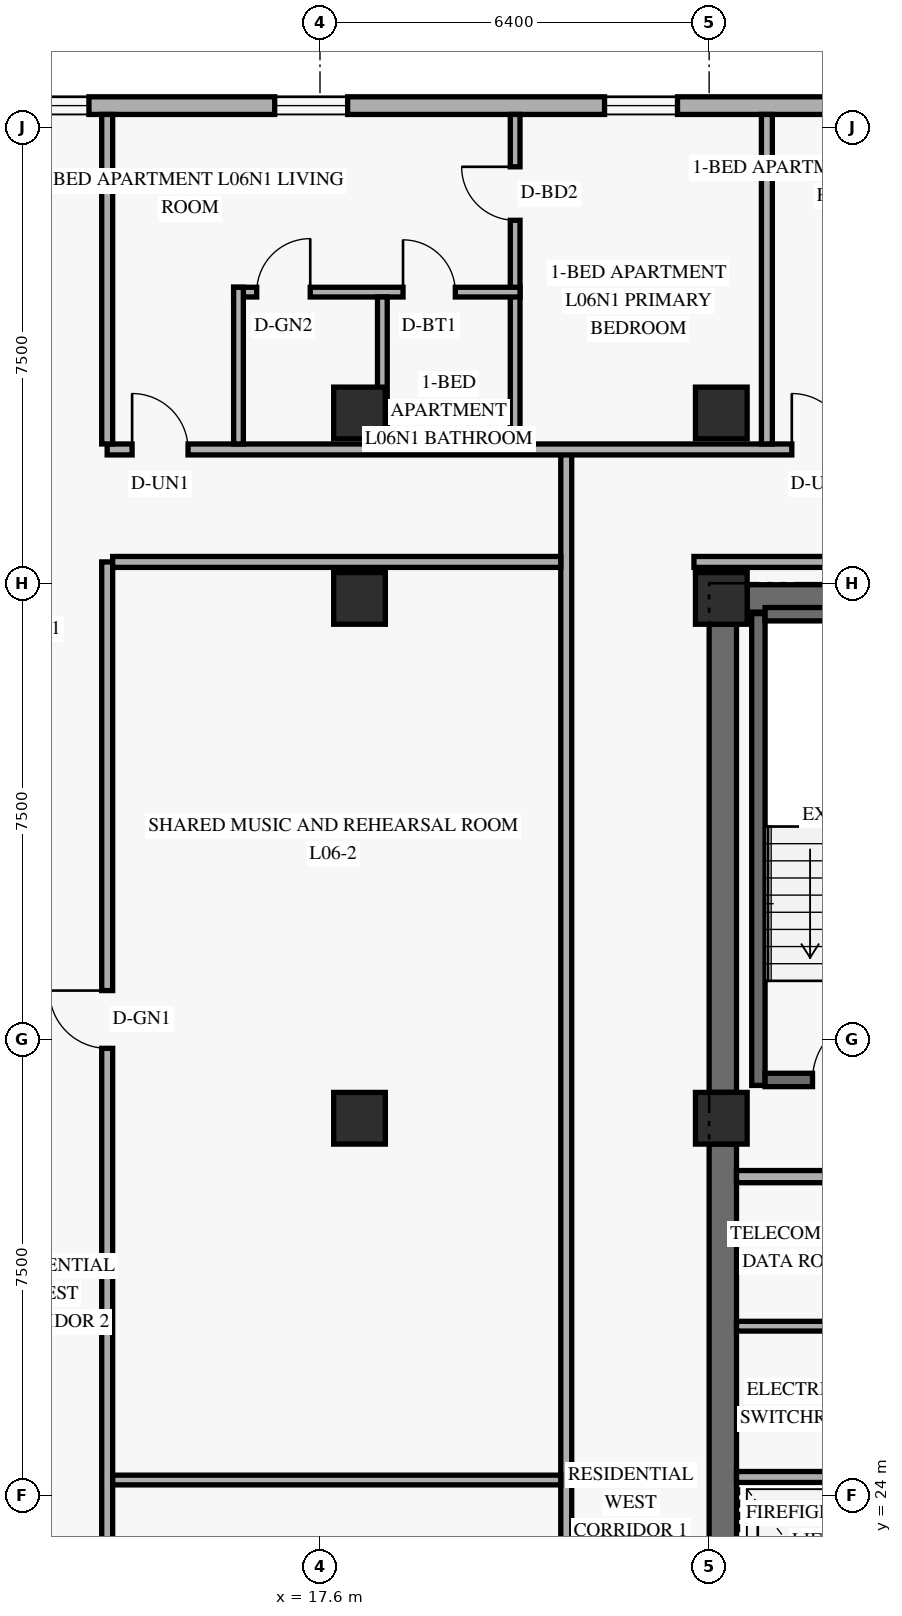
"""IFC4 building model, lengths in metres.
Left out: names, types, materials, properties, quantities, classifications, styles, units other than length and angle.
Written with IfcOpenShell. Run it as: python <this file> out.ifc"""

import sys

from ifc_helpers import new_model, si_unit, direction, frame, frame_2d, origin, origin_2d, place, context, subcontext, project, spatial, rectangle, extrude, element, fill, save


model = new_model("IFC4")
c1 = context("Model", 3, precision=1e-05, world=origin(), true_north=direction((0.0, 1.0)))
c2 = subcontext(c1, "Body", "Model", "MODEL_VIEW")
j1 = project(units=[si_unit("LENGTHUNIT", "METRE"), si_unit("PLANEANGLEUNIT", "RADIAN")], contexts=[c1])
p1 = place(None, origin())
s1 = spatial("IfcSite", under=j1, at=p1, CompositionType="ELEMENT")
p2 = place(p1, origin())
s2 = spatial("IfcBuilding", under=s1, at=p2, CompositionType="ELEMENT")
p3 = place(p2, frame((0.0, 0.0, 27.6)))
s3 = spatial("IfcBuildingStorey", under=s2, at=p3, CompositionType="ELEMENT", Elevation=27.6)
p4 = place(p3, frame((24.225, 17.975, 0.0), z_axis=(0.0, 0.0, 1.0), x_axis=(0.0, 1.0, 0.0)))
e1 = element("IfcWall", 1, at=p4, inside=s3, PredefinedType="SHEAR", context=c2, shape_type="SweptSolid", body=[
    extrude(rectangle(XDim=11.8, YDim=0.45, at=frame_2d((5.9, 0.0))), origin(), (0.0, 0.0, 1.0), 2.667),
])
p5 = place(p3, frame((24.225, 30.625, 0.0), z_axis=(0.0, 0.0, 1.0), x_axis=(0.0, 1.0, 0.0)))
e2 = element("IfcWall", 2, at=p5, inside=s3, PredefinedType="SHEAR", context=c2, shape_type="SweptSolid", body=[
    extrude(rectangle(XDim=7.7, YDim=0.45, at=frame_2d((3.85, 0.0))), origin(), (0.0, 0.0, 1.0), 2.667),
])
p6 = place(p3, frame((24.625, 38.75, 0.0), z_axis=(0.0, 0.0, 1.0), x_axis=(1.0, 0.0, 0.0)))
e3 = element("IfcWall", 3, at=p6, inside=s3, PredefinedType="SHEAR", context=c2, shape_type="SweptSolid", body=[
    extrude(rectangle(XDim=10.15, YDim=0.45, at=frame_2d((5.075, 0.0))), origin(), (0.0, 0.0, 1.0), 3.36),
])
p7 = place(p3, frame((24.81, 30.74, 0.0), z_axis=(0.0, 0.0, 1.0), x_axis=(0.0, 1.0, 0.0)))
e4 = element("IfcWall", 4, at=p7, inside=s3, PredefinedType="SHEAR", context=c2, shape_type="SweptSolid", body=[
    extrude(rectangle(XDim=7.76, YDim=0.22, at=frame_2d((3.88, 0.0))), origin(), (0.0, 0.0, 1.0), 3.36),
])
p8 = place(p3, frame((24.92, 30.83, 0.0), z_axis=(0.0, 0.0, 1.0), x_axis=(1.0, 0.0, 0.0)))
e5 = element("IfcWall", 5, at=p8, inside=s3, PredefinedType="SHEAR", context=c2, shape_type="SweptSolid", body=[
    extrude(rectangle(XDim=3.16, YDim=0.22, at=frame_2d((1.58, 0.0))), origin(), (0.0, 0.0, 1.0), 3.36),
])
p9 = place(p8, frame((0.78, 0.0, 0.0)))
e6 = element("IfcOpeningElement", 6, at=p9, cuts=e5, PredefinedType="OPENING", context=c2, shape_type="SweptSolid", body=[
    extrude(rectangle(XDim=1.05, YDim=2.15, at=frame_2d((0.525, 1.075))), frame((0.0, 0.12, 0.0), z_axis=(0.0, -1.0, 0.0), x_axis=(1.0, 0.0, 0.0)), (0.0, 0.0, 1.0), 0.24),
])
p10 = place(p3, frame((24.92, 38.49, 0.0), z_axis=(0.0, 0.0, 1.0), x_axis=(1.0, 0.0, 0.0)))
e7 = element("IfcWall", 7, at=p10, inside=s3, PredefinedType="SHEAR", context=c2, shape_type="SweptSolid", body=[
    extrude(rectangle(XDim=3.16, YDim=0.22, at=frame_2d((1.58, 0.0))), origin(), (0.0, 0.0, 1.0), 3.36),
])
for number, where, z_axis, x_axis in (
    (8, (18.25, 30.2, 0.0), (0.0, 0.0, 1.0), (1.0, 0.0, 0.0)),
    (9, (18.25, 38.75, 0.0), (0.0, 0.0, 1.0), (1.0, 0.0, 0.0)),
    (10, (18.25, 41.8, 0.0), (0.0, 0.0, 1.0), (1.0, 0.0, 0.0)),
    (11, (24.2, 30.2, 0.0), (0.0, 0.0, 1.0), (1.0, 0.0, 0.0)),
    (12, (24.2, 38.75, 0.0), (0.0, 0.0, 1.0), (1.0, 0.0, 0.0)),
    (13, (24.2, 41.8, 0.0), (0.0, 0.0, 1.0), (1.0, 0.0, 0.0)),
):
    element("IfcColumn", number, at=place(p3, frame(where, z_axis=z_axis, x_axis=x_axis)), inside=s3, PredefinedType="COLUMN", context=c2, shape_type="SweptSolid", body=[
        extrude(rectangle(XDim=0.85, YDim=0.85, at=origin_2d()), origin(), (0.0, 0.0, 1.0), 3.6),
    ])
p11 = place(p3, frame((44.98, 46.855, 0.0), z_axis=(0.0, 0.0, 1.0), x_axis=(-1.0, 0.0, 0.0)))
e14 = element("IfcWall", 14, at=p11, inside=s3, PredefinedType="SOLIDWALL", context=c2, shape_type="SweptSolid", body=[
    extrude(rectangle(XDim=39.56, YDim=0.29, at=frame_2d((19.78, 0.0))), origin(), (0.0, 0.0, 1.0), 3.36),
])
p12 = place(p11, frame((35.52, 0.0, 0.85)))
e15 = element("IfcOpeningElement", 15, at=p12, cuts=e14, PredefinedType="OPENING", context=c2, shape_type="SweptSolid", body=[
    extrude(rectangle(XDim=1.2, YDim=1.5, at=frame_2d((0.6, 0.75))), frame((0.0, 0.155, 0.0), z_axis=(0.0, -1.0, 0.0), x_axis=(1.0, 0.0, 0.0)), (0.0, 0.0, 1.0), 0.31),
])
p13 = place(p11, frame((31.18, 0.0, 0.85)))
e16 = element("IfcOpeningElement", 16, at=p13, cuts=e14, PredefinedType="OPENING", context=c2, shape_type="SweptSolid", body=[
    extrude(rectangle(XDim=1.2, YDim=1.5, at=frame_2d((0.6, 0.75))), frame((0.0, 0.155, 0.0), z_axis=(0.0, -1.0, 0.0), x_axis=(1.0, 0.0, 0.0)), (0.0, 0.0, 1.0), 0.31),
])
p14 = place(p11, frame((26.925, 0.0, 0.85)))
e17 = element("IfcOpeningElement", 17, at=p14, cuts=e14, PredefinedType="OPENING", context=c2, shape_type="SweptSolid", body=[
    extrude(rectangle(XDim=1.2, YDim=1.5, at=frame_2d((0.6, 0.75))), frame((0.0, 0.155, 0.0), z_axis=(0.0, -1.0, 0.0), x_axis=(1.0, 0.0, 0.0)), (0.0, 0.0, 1.0), 0.31),
])
p15 = place(p11, frame((21.5, 0.0, 0.85)))
e18 = element("IfcOpeningElement", 18, at=p15, cuts=e14, PredefinedType="OPENING", context=c2, shape_type="SweptSolid", body=[
    extrude(rectangle(XDim=1.2, YDim=1.5, at=frame_2d((0.6, 0.75))), frame((0.0, 0.155, 0.0), z_axis=(0.0, -1.0, 0.0), x_axis=(1.0, 0.0, 0.0)), (0.0, 0.0, 1.0), 0.31),
])
p16 = place(p11, frame((16.265, 0.0, 0.85)))
e19 = element("IfcOpeningElement", 19, at=p16, cuts=e14, PredefinedType="OPENING", context=c2, shape_type="SweptSolid", body=[
    extrude(rectangle(XDim=1.2, YDim=1.5, at=frame_2d((0.6, 0.75))), frame((0.0, 0.155, 0.0), z_axis=(0.0, -1.0, 0.0), x_axis=(1.0, 0.0, 0.0)), (0.0, 0.0, 1.0), 0.31),
])
p17 = place(p11, frame((11.03, 0.0, 0.85)))
e20 = element("IfcOpeningElement", 20, at=p17, cuts=e14, PredefinedType="OPENING", context=c2, shape_type="SweptSolid", body=[
    extrude(rectangle(XDim=1.2, YDim=1.5, at=frame_2d((0.6, 0.75))), frame((0.0, 0.155, 0.0), z_axis=(0.0, -1.0, 0.0), x_axis=(1.0, 0.0, 0.0)), (0.0, 0.0, 1.0), 0.31),
])
p18 = place(p11, frame((7.895, 0.0, 0.85)))
e21 = element("IfcOpeningElement", 21, at=p18, cuts=e14, PredefinedType="OPENING", context=c2, shape_type="SweptSolid", body=[
    extrude(rectangle(XDim=1.2, YDim=1.5, at=frame_2d((0.6, 0.75))), frame((0.0, 0.155, 0.0), z_axis=(0.0, -1.0, 0.0), x_axis=(1.0, 0.0, 0.0)), (0.0, 0.0, 1.0), 0.31),
])
p19 = place(p11, frame((3.115, 0.0, 0.85)))
e22 = element("IfcOpeningElement", 22, at=p19, cuts=e14, PredefinedType="OPENING", context=c2, shape_type="SweptSolid", body=[
    extrude(rectangle(XDim=1.2, YDim=1.5, at=frame_2d((0.6, 0.75))), frame((0.0, 0.155, 0.0), z_axis=(0.0, -1.0, 0.0), x_axis=(1.0, 0.0, 0.0)), (0.0, 0.0, 1.0), 0.31),
])
p20 = place(p3, frame((24.45, 24.3, 0.0), z_axis=(0.0, 0.0, 1.0), x_axis=(1.0, 0.0, 0.0)))
e23 = element("IfcWall", 23, at=p20, inside=s3, PredefinedType="STANDARD", context=c2, shape_type="SweptSolid", body=[
    extrude(rectangle(XDim=6.83, YDim=0.18, at=frame_2d((3.415, 0.0))), origin(), (0.0, 0.0, 1.0), 3.36),
])
p21 = place(p3, frame((24.45, 29.24, 0.0), z_axis=(0.0, 0.0, 1.0), x_axis=(1.0, 0.0, 0.0)))
e24 = element("IfcWall", 24, at=p21, inside=s3, PredefinedType="STANDARD", context=c2, shape_type="SweptSolid", body=[
    extrude(rectangle(XDim=3.65, YDim=0.2, at=frame_2d((1.825, 0.0))), origin(), (0.0, 0.0, 1.0), 3.36),
])
p22 = place(p3, frame((24.45, 26.78, 0.0), z_axis=(0.0, 0.0, 1.0), x_axis=(1.0, 0.0, 0.0)))
e25 = element("IfcWall", 25, at=p22, inside=s3, PredefinedType="PARTITIONING", context=c2, shape_type="SweptSolid", body=[
    extrude(rectangle(XDim=3.55, YDim=0.16, at=frame_2d((1.775, 0.0))), origin(), (0.0, 0.0, 1.0), 3.36),
])
p23 = place(p3, frame((21.65, 6.8, 0.0), z_axis=(0.0, 0.0, 1.0), x_axis=(0.0, 1.0, 0.0)))
e26 = element("IfcWall", 26, at=p23, inside=s3, PredefinedType="STANDARD", context=c2, shape_type="SweptSolid", body=[
    extrude(rectangle(XDim=34.4, YDim=0.18, at=frame_2d((17.2, 0.0))), origin(), (0.0, 0.0, 1.0), 2.649),
])
p24 = place(p3, frame((14.1, 41.2, 0.0), z_axis=(0.0, 0.0, 1.0), x_axis=(1.0, 0.0, 0.0)))
e27 = element("IfcWall", 27, at=p24, inside=s3, PredefinedType="STANDARD", context=c2, shape_type="SweptSolid", body=[
    extrude(rectangle(XDim=21.32, YDim=0.18, at=frame_2d((10.66, 0.0))), origin(), (0.0, 0.0, 1.0), 2.649),
])
p25 = place(p24, frame((0.41, 0.0, 0.0)))
e28 = element("IfcOpeningElement", 28, at=p25, cuts=e27, PredefinedType="OPENING", context=c2, shape_type="SweptSolid", body=[
    extrude(rectangle(XDim=0.92, YDim=2.15, at=frame_2d((0.46, 1.075))), frame((0.0, 0.1, 0.0), z_axis=(0.0, -1.0, 0.0), x_axis=(1.0, 0.0, 0.0)), (0.0, 0.0, 1.0), 0.2),
])
p26 = place(p24, frame((11.26, 0.0, 0.0)))
e29 = element("IfcOpeningElement", 29, at=p26, cuts=e27, PredefinedType="OPENING", context=c2, shape_type="SweptSolid", body=[
    extrude(rectangle(XDim=0.92, YDim=2.15, at=frame_2d((0.46, 1.075))), frame((0.0, 0.1, 0.0), z_axis=(0.0, -1.0, 0.0), x_axis=(1.0, 0.0, 0.0)), (0.0, 0.0, 1.0), 0.2),
])
p27 = place(p3, frame((23.75, 39.35, 0.0), z_axis=(0.0, 0.0, 1.0), x_axis=(1.0, 0.0, 0.0)))
e30 = element("IfcWall", 30, at=p27, inside=s3, PredefinedType="STANDARD", context=c2, shape_type="SweptSolid", body=[
    extrude(rectangle(XDim=11.67, YDim=0.18, at=frame_2d((5.835, 0.0))), origin(), (0.0, 0.0, 1.0), 2.649),
])
p28 = place(p3, frame((14.1, 8.65, 0.0), z_axis=(0.0, 0.0, 1.0), x_axis=(0.0, 1.0, 0.0)))
e31 = element("IfcWall", 31, at=p28, inside=s3, PredefinedType="STANDARD", context=c2, shape_type="SweptSolid", body=[
    extrude(rectangle(XDim=30.7, YDim=0.18, at=frame_2d((15.35, 0.0))), origin(), (0.0, 0.0, 1.0), 2.649),
])
p29 = place(p28, frame((7.35, 0.0, 0.0)))
e32 = element("IfcOpeningElement", 32, at=p29, cuts=e31, PredefinedType="OPENING", context=c2, shape_type="SweptSolid", body=[
    extrude(rectangle(XDim=0.95, YDim=2.15, at=frame_2d((0.475, 1.075))), frame((0.0, 0.1, 0.0), z_axis=(0.0, -1.0, 0.0), x_axis=(1.0, 0.0, 0.0)), (0.0, 0.0, 1.0), 0.2),
])
p30 = place(p28, frame((22.7, 0.0, 0.0)))
e33 = element("IfcOpeningElement", 33, at=p30, cuts=e31, PredefinedType="OPENING", context=c2, shape_type="SweptSolid", body=[
    extrude(rectangle(XDim=0.95, YDim=2.15, at=frame_2d((0.475, 1.075))), frame((0.0, 0.1, 0.0), z_axis=(0.0, -1.0, 0.0), x_axis=(1.0, 0.0, 0.0)), (0.0, 0.0, 1.0), 0.2),
])
p31 = place(p3, frame((14.19, 39.35, 0.0), z_axis=(0.0, 0.0, 1.0), x_axis=(1.0, 0.0, 0.0)))
e34 = element("IfcWall", 34, at=p31, inside=s3, PredefinedType="STANDARD", context=c2, shape_type="SweptSolid", body=[
    extrude(rectangle(XDim=7.37, YDim=0.18, at=frame_2d((3.685, 0.0))), origin(), (0.0, 0.0, 1.0), 2.649),
])
p32 = place(p3, frame((14.1, 41.29, 0.0), z_axis=(0.0, 0.0, 1.0), x_axis=(0.0, 1.0, 0.0)))
e35 = element("IfcWall", 35, at=p32, inside=s3, PredefinedType="PARTITIONING", context=c2, shape_type="SweptSolid", body=[
    extrude(rectangle(XDim=5.42, YDim=0.18, at=frame_2d((2.71, 0.0))), origin(), (0.0, 0.0, 1.0), 2.809),
])
p33 = place(p3, frame((14.19, 24.25, 0.0), z_axis=(0.0, 0.0, 1.0), x_axis=(1.0, 0.0, 0.0)))
e36 = element("IfcWall", 36, at=p33, inside=s3, PredefinedType="PARTITIONING", context=c2, shape_type="SweptSolid", body=[
    extrude(rectangle(XDim=7.37, YDim=0.16, at=frame_2d((3.685, 0.0))), origin(), (0.0, 0.0, 1.0), 2.649),
])
p34 = place(p3, frame((24.95, 41.29, 0.0), z_axis=(0.0, 0.0, 1.0), x_axis=(0.0, 1.0, 0.0)))
e37 = element("IfcWall", 37, at=p34, inside=s3, PredefinedType="PARTITIONING", context=c2, shape_type="SweptSolid", body=[
    extrude(rectangle(XDim=5.42, YDim=0.18, at=frame_2d((2.71, 0.0))), origin(), (0.0, 0.0, 1.0), 2.809),
])
p35 = place(p3, frame((20.81, 41.29, 0.0), z_axis=(0.0, 0.0, 1.0), x_axis=(0.0, 1.0, 0.0)))
e38 = element("IfcWall", 38, at=p35, inside=s3, PredefinedType="PARTITIONING", context=c2, shape_type="SweptSolid", body=[
    extrude(rectangle(XDim=5.42, YDim=0.16, at=frame_2d((2.71, 0.0))), origin(), (0.0, 0.0, 1.0), 2.809),
])
p36 = place(p35, frame((3.679, 0.0, 0.0)))
e39 = element("IfcOpeningElement", 39, at=p36, cuts=e38, PredefinedType="OPENING", context=c2, shape_type="SweptSolid", body=[
    extrude(rectangle(XDim=0.88, YDim=2.14, at=frame_2d((0.44, 1.07))), frame((0.0, 0.09, 0.0), z_axis=(0.0, -1.0, 0.0), x_axis=(1.0, 0.0, 0.0)), (0.0, 0.0, 1.0), 0.18),
])
p37 = place(p3, frame((16.18, 43.788, 0.0), z_axis=(0.0, 0.0, 1.0), x_axis=(1.0, 0.0, 0.0)))
e40 = element("IfcWall", 40, at=p37, inside=s3, PredefinedType="PLUMBINGWALL", context=c2, shape_type="SweptSolid", body=[
    extrude(rectangle(XDim=4.71, YDim=0.16, at=frame_2d((2.355, 0.0))), origin(), (0.0, 0.0, 1.0), 3.36),
])
p38 = place(p37, frame((0.38, 0.0, 0.0)))
e41 = element("IfcOpeningElement", 41, at=p38, cuts=e40, PredefinedType="OPENING", context=c2, shape_type="SweptSolid", body=[
    extrude(rectangle(XDim=0.88, YDim=2.12, at=frame_2d((0.44, 1.06))), frame((0.0, 0.09, 0.0), z_axis=(0.0, -1.0, 0.0), x_axis=(1.0, 0.0, 0.0)), (0.0, 0.0, 1.0), 0.18),
])
p39 = place(p37, frame((2.786, 0.0, 0.0)))
e42 = element("IfcOpeningElement", 42, at=p39, cuts=e40, PredefinedType="OPENING", context=c2, shape_type="SweptSolid", body=[
    extrude(rectangle(XDim=0.86, YDim=2.12, at=frame_2d((0.43, 1.06))), frame((0.0, 0.09, 0.0), z_axis=(0.0, -1.0, 0.0), x_axis=(1.0, 0.0, 0.0)), (0.0, 0.0, 1.0), 0.18),
])
p40 = place(p3, frame((16.26, 41.29, 0.0), z_axis=(0.0, 0.0, 1.0), x_axis=(0.0, 1.0, 0.0)))
e43 = element("IfcWall", 43, at=p40, inside=s3, PredefinedType="PLUMBINGWALL", context=c2, shape_type="SweptSolid", body=[
    extrude(rectangle(XDim=2.577, YDim=0.16, at=frame_2d((1.289, 0.0))), origin(), (0.0, 0.0, 1.0), 2.809),
])
p41 = place(p3, frame((18.625, 41.29, 0.0), z_axis=(0.0, 0.0, 1.0), x_axis=(0.0, 1.0, 0.0)))
e44 = element("IfcWall", 44, at=p41, inside=s3, PredefinedType="PLUMBINGWALL", context=c2, shape_type="SweptSolid", body=[
    extrude(rectangle(XDim=2.417, YDim=0.16, at=frame_2d((1.209, 0.0))), origin(), (0.0, 0.0, 1.0), 2.809),
])
p42 = place(p13, origin())
e45 = element("IfcWindow", 45, at=p42, inside=s3, PartitioningType="SINGLE_PANEL", PredefinedType="WINDOW", context=c2, shape_type="SweptSolid", body=[
    extrude(rectangle(XDim=1.2, YDim=1.5, at=frame_2d((0.6, 0.75))), frame((0.0, 0.03, 0.0), z_axis=(0.0, -1.0, 0.0), x_axis=(1.0, 0.0, 0.0)), (0.0, 0.0, 1.0), 0.06),
])
fill(e16, e45)
p43 = place(p14, origin())
e46 = element("IfcWindow", 46, at=p43, inside=s3, PartitioningType="SINGLE_PANEL", PredefinedType="WINDOW", context=c2, shape_type="SweptSolid", body=[
    extrude(rectangle(XDim=1.2, YDim=1.5, at=frame_2d((0.6, 0.75))), frame((0.0, 0.03, 0.0), z_axis=(0.0, -1.0, 0.0), x_axis=(1.0, 0.0, 0.0)), (0.0, 0.0, 1.0), 0.06),
])
fill(e17, e46)
p44 = place(p15, origin())
e47 = element("IfcWindow", 47, at=p44, inside=s3, PartitioningType="SINGLE_PANEL", PredefinedType="WINDOW", context=c2, shape_type="SweptSolid", body=[
    extrude(rectangle(XDim=1.2, YDim=1.5, at=frame_2d((0.6, 0.75))), frame((0.0, 0.03, 0.0), z_axis=(0.0, -1.0, 0.0), x_axis=(1.0, 0.0, 0.0)), (0.0, 0.0, 1.0), 0.06),
])
fill(e18, e47)
p45 = place(p9, origin())
e48 = element("IfcDoor", 48, at=p45, inside=s3, OperationType="SINGLE_SWING_RIGHT", PredefinedType="DOOR", context=c2, shape_type="SweptSolid", body=[
    extrude(rectangle(XDim=1.05, YDim=2.15, at=frame_2d((0.525, 1.075))), frame((0.0, 0.025, 0.0), z_axis=(0.0, -1.0, 0.0), x_axis=(1.0, 0.0, 0.0)), (0.0, 0.0, 1.0), 0.05),
])
fill(e6, e48)
p46 = place(p30, origin())
e49 = element("IfcDoor", 49, at=p46, inside=s3, OperationType="SINGLE_SWING_RIGHT", PredefinedType="DOOR", context=c2, shape_type="SweptSolid", body=[
    extrude(rectangle(XDim=0.95, YDim=2.15, at=frame_2d((0.475, 1.075))), frame((0.0, 0.025, 0.0), z_axis=(0.0, -1.0, 0.0), x_axis=(1.0, 0.0, 0.0)), (0.0, 0.0, 1.0), 0.05),
])
fill(e33, e49)
p47 = place(p25, origin())
e50 = element("IfcDoor", 50, at=p47, inside=s3, OperationType="SINGLE_SWING_LEFT", PredefinedType="DOOR", context=c2, shape_type="SweptSolid", body=[
    extrude(rectangle(XDim=0.92, YDim=2.15, at=frame_2d((0.46, 1.075))), frame((0.0, 0.025, 0.0), z_axis=(0.0, -1.0, 0.0), x_axis=(1.0, 0.0, 0.0)), (0.0, 0.0, 1.0), 0.05),
])
fill(e28, e50)
p48 = place(p38, origin())
e51 = element("IfcDoor", 51, at=p48, inside=s3, OperationType="SINGLE_SWING_RIGHT", PredefinedType="DOOR", context=c2, shape_type="SweptSolid", body=[
    extrude(rectangle(XDim=0.88, YDim=2.12, at=frame_2d((0.44, 1.06))), frame((0.0, 0.025, 0.0), z_axis=(0.0, -1.0, 0.0), x_axis=(1.0, 0.0, 0.0)), (0.0, 0.0, 1.0), 0.05),
])
fill(e41, e51)
p49 = place(p39, origin())
e52 = element("IfcDoor", 52, at=p49, inside=s3, OperationType="SINGLE_SWING_LEFT", PredefinedType="DOOR", context=c2, shape_type="SweptSolid", body=[
    extrude(rectangle(XDim=0.86, YDim=2.12, at=frame_2d((0.43, 1.06))), frame((0.0, 0.025, 0.0), z_axis=(0.0, -1.0, 0.0), x_axis=(1.0, 0.0, 0.0)), (0.0, 0.0, 1.0), 0.05),
])
fill(e42, e52)
p50 = place(p36, origin())
e53 = element("IfcDoor", 53, at=p50, inside=s3, OperationType="SINGLE_SWING_RIGHT", PredefinedType="DOOR", context=c2, shape_type="SweptSolid", body=[
    extrude(rectangle(XDim=0.88, YDim=2.14, at=frame_2d((0.44, 1.07))), frame((0.0, 0.025, 0.0), z_axis=(0.0, -1.0, 0.0), x_axis=(1.0, 0.0, 0.0)), (0.0, 0.0, 1.0), 0.05),
])
fill(e39, e53)
p51 = place(p26, origin())
e54 = element("IfcDoor", 54, at=p51, inside=s3, OperationType="SINGLE_SWING_LEFT", PredefinedType="DOOR", context=c2, shape_type="SweptSolid", body=[
    extrude(rectangle(XDim=0.92, YDim=2.15, at=frame_2d((0.46, 1.075))), frame((0.0, 0.025, 0.0), z_axis=(0.0, -1.0, 0.0), x_axis=(1.0, 0.0, 0.0)), (0.0, 0.0, 1.0), 0.05),
])
fill(e29, e54)
save(model, sys.argv[1])
